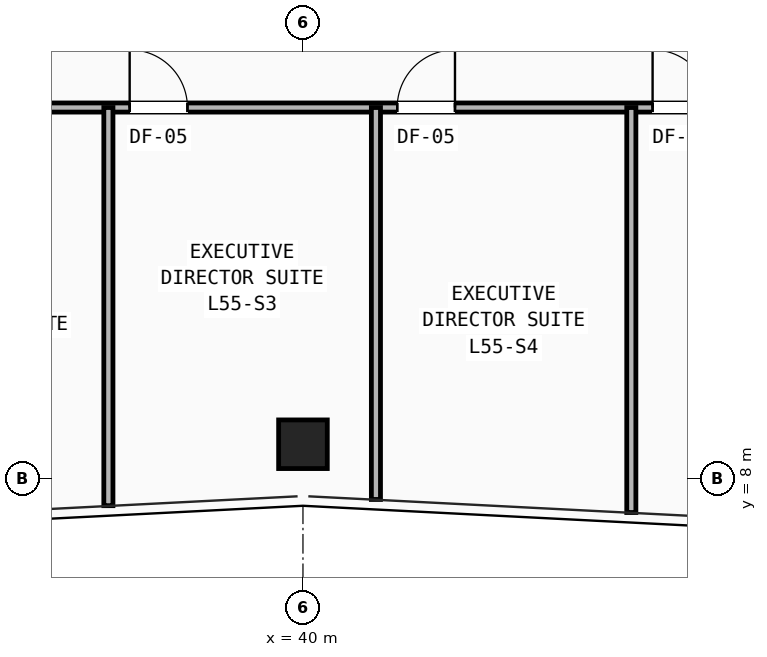
"""IFC4 building model, lengths in metres.
Left out: names, types, materials, properties, quantities, classifications, styles, units other than length and angle.
Written with IfcOpenShell. Run it as: python <this file> out.ifc"""

import sys

from ifc_helpers import new_model, si_unit, direction, frame, frame_2d, origin, origin_2d, place, context, subcontext, project, spatial, rectangle, hollow_rectangle, extrude, element, fill, save


model = new_model("IFC4")
c1 = context("Model", 3, precision=1e-05, world=origin(), true_north=direction((0.0, 1.0)))
c2 = subcontext(c1, "Body", "Model", "MODEL_VIEW")
j1 = project(units=[si_unit("LENGTHUNIT", "METRE"), si_unit("PLANEANGLEUNIT", "RADIAN")], contexts=[c1])
p1 = place(None, origin())
s1 = spatial("IfcSite", under=j1, at=p1, CompositionType="ELEMENT")
p2 = place(p1, origin())
s2 = spatial("IfcBuilding", under=s1, at=p2, CompositionType="ELEMENT")
p3 = place(p2, frame((0.0, 0.0, 193.05)))
s3 = spatial("IfcBuildingStorey", under=s2, at=p3, CompositionType="ELEMENT", Elevation=193.05)
p4 = place(p3, frame((40.0, 8.562, 0.0), z_axis=(0.0, 0.0, 1.0), x_axis=(1.0, 0.0, 0.0)))
e1 = element("IfcColumn", 1, at=p4, inside=s3, PredefinedType="COLUMN", context=c2, shape_type="SweptSolid", body=[
    extrude(hollow_rectangle(XDim=0.8, YDim=0.8, WallThickness=0.055, at=origin_2d()), origin(), (0.0, 0.0, 1.0), 3.45),
])
p5 = place(p3, frame((29.6, 14.1, 0.0), z_axis=(0.0, 0.0, 1.0), x_axis=(1.0, 0.0, 0.0)))
e2 = element("IfcWall", 2, at=p5, inside=s3, PredefinedType="PARTITIONING", context=c2, shape_type="SweptSolid", body=[
    extrude(rectangle(XDim=18.6, YDim=0.15, at=frame_2d((9.3, 0.0))), origin(), (0.0, 0.0, 1.0), 2.161),
])
p6 = place(p5, frame((0.55, 0.0, 0.0)))
e3 = element("IfcOpeningElement", 3, at=p6, cuts=e2, PredefinedType="OPENING", context=c2, shape_type="SweptSolid", body=[
    extrude(rectangle(XDim=0.95, YDim=2.1, at=frame_2d((0.475, 1.05))), frame((0.0, 0.085, 0.0), z_axis=(0.0, -1.0, 0.0), x_axis=(1.0, 0.0, 0.0)), (0.0, 0.0, 1.0), 0.17),
])
p7 = place(p5, frame((3.55, 0.0, 0.0)))
e4 = element("IfcOpeningElement", 4, at=p7, cuts=e2, PredefinedType="OPENING", context=c2, shape_type="SweptSolid", body=[
    extrude(rectangle(XDim=0.95, YDim=2.1, at=frame_2d((0.475, 1.05))), frame((0.0, 0.085, 0.0), z_axis=(0.0, -1.0, 0.0), x_axis=(1.0, 0.0, 0.0)), (0.0, 0.0, 1.0), 0.17),
])
p8 = place(p5, frame((7.55, 0.0, 0.0)))
e5 = element("IfcOpeningElement", 5, at=p8, cuts=e2, PredefinedType="OPENING", context=c2, shape_type="SweptSolid", body=[
    extrude(rectangle(XDim=0.95, YDim=2.1, at=frame_2d((0.475, 1.05))), frame((0.0, 0.085, 0.0), z_axis=(0.0, -1.0, 0.0), x_axis=(1.0, 0.0, 0.0)), (0.0, 0.0, 1.0), 0.17),
])
p9 = place(p5, frame((11.95, 0.0, 0.0)))
e6 = element("IfcOpeningElement", 6, at=p9, cuts=e2, PredefinedType="OPENING", context=c2, shape_type="SweptSolid", body=[
    extrude(rectangle(XDim=0.95, YDim=2.1, at=frame_2d((0.475, 1.05))), frame((0.0, 0.085, 0.0), z_axis=(0.0, -1.0, 0.0), x_axis=(1.0, 0.0, 0.0)), (0.0, 0.0, 1.0), 0.17),
])
p10 = place(p5, frame((16.15, 0.0, 0.0)))
e7 = element("IfcOpeningElement", 7, at=p10, cuts=e2, PredefinedType="OPENING", context=c2, shape_type="SweptSolid", body=[
    extrude(rectangle(XDim=0.95, YDim=2.1, at=frame_2d((0.475, 1.05))), frame((0.0, 0.085, 0.0), z_axis=(0.0, -1.0, 0.0), x_axis=(1.0, 0.0, 0.0)), (0.0, 0.0, 1.0), 0.17),
])
p11 = place(p3, frame((36.8, 7.552, 0.0), z_axis=(0.0, 0.0, 1.0), x_axis=(0.0, 1.0, 0.0)))
e8 = element("IfcWall", 8, at=p11, inside=s3, PredefinedType="PARTITIONING", context=c2, shape_type="SweptSolid", body=[
    extrude(rectangle(XDim=6.549, YDim=0.15, at=frame_2d((3.274, 0.0))), origin(), (0.0, 0.0, 1.0), 2.161),
])
p12 = place(p3, frame((41.2, 7.654, 0.0), z_axis=(0.0, 0.0, 1.0), x_axis=(0.0, 1.0, 0.0)))
e9 = element("IfcWall", 9, at=p12, inside=s3, PredefinedType="PARTITIONING", context=c2, shape_type="SweptSolid", body=[
    extrude(rectangle(XDim=6.446, YDim=0.15, at=frame_2d((3.223, 0.0))), origin(), (0.0, 0.0, 1.0), 2.409),
])
p13 = place(p3, frame((45.4, 7.439, 0.0), z_axis=(0.0, 0.0, 1.0), x_axis=(0.0, 1.0, 0.0)))
e10 = element("IfcWall", 10, at=p13, inside=s3, PredefinedType="PARTITIONING", context=c2, shape_type="SweptSolid", body=[
    extrude(rectangle(XDim=6.661, YDim=0.15, at=frame_2d((3.331, 0.0))), origin(), (0.0, 0.0, 1.0), 2.409),
])
p14 = place(p8, origin())
e11 = element("IfcDoor", 11, at=p14, inside=s3, OperationType="SINGLE_SWING_LEFT", PredefinedType="DOOR", context=c2, shape_type="SweptSolid", body=[
    extrude(rectangle(XDim=0.95, YDim=2.1, at=frame_2d((0.475, 1.05))), frame((0.0, 0.025, 0.0), z_axis=(0.0, -1.0, 0.0), x_axis=(1.0, 0.0, 0.0)), (0.0, 0.0, 1.0), 0.05),
])
fill(e5, e11)
p15 = place(p9, origin())
e12 = element("IfcDoor", 12, at=p15, inside=s3, OperationType="SINGLE_SWING_RIGHT", PredefinedType="DOOR", context=c2, shape_type="SweptSolid", body=[
    extrude(rectangle(XDim=0.95, YDim=2.1, at=frame_2d((0.475, 1.05))), frame((0.0, 0.025, 0.0), z_axis=(0.0, -1.0, 0.0), x_axis=(1.0, 0.0, 0.0)), (0.0, 0.0, 1.0), 0.05),
])
fill(e6, e12)
p16 = place(p10, origin())
e13 = element("IfcDoor", 13, at=p16, inside=s3, OperationType="SINGLE_SWING_LEFT", PredefinedType="DOOR", context=c2, shape_type="SweptSolid", body=[
    extrude(rectangle(XDim=0.95, YDim=2.1, at=frame_2d((0.475, 1.05))), frame((0.0, 0.025, 0.0), z_axis=(0.0, -1.0, 0.0), x_axis=(1.0, 0.0, 0.0)), (0.0, 0.0, 1.0), 0.05),
])
fill(e7, e13)
save(model, sys.argv[1])
